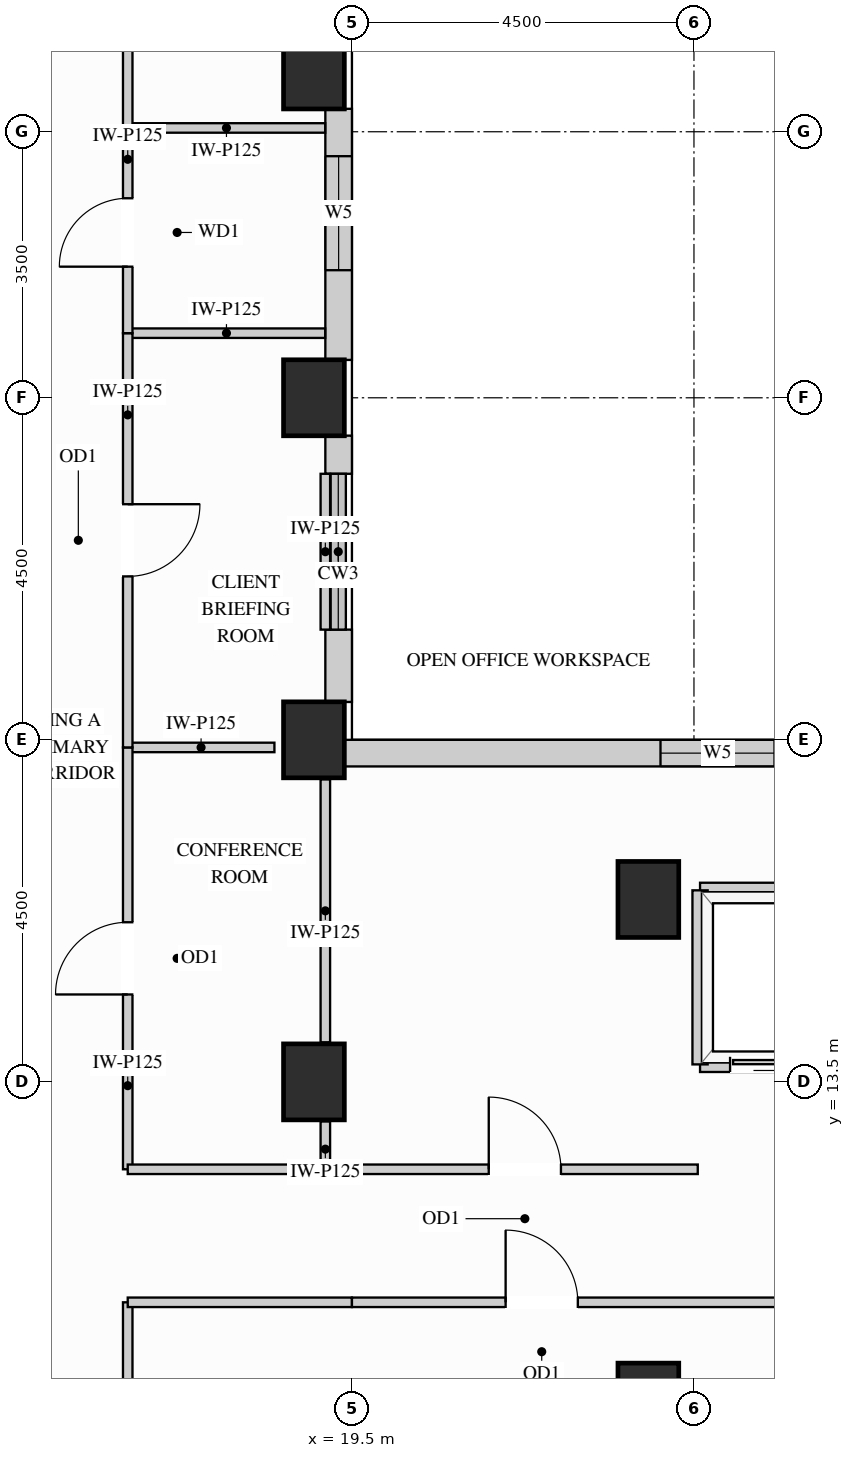
"""IFC4 building model, lengths in metres.
Left out: names, types, materials, properties, quantities, classifications, styles, units other than length and angle.
Written with IfcOpenShell. Run it as: python <this file> out.ifc"""

import sys

from ifc_helpers import new_model, si_unit, direction, frame, frame_2d, origin, origin_2d, place, context, subcontext, project, spatial, rectangle, extrude, source, transform, mapped, element, fill, save


model = new_model("IFC4")
c1 = context("Model", 3, precision=1e-05, world=origin(), true_north=direction((0.0, 1.0)))
c2 = subcontext(c1, "Body", "Model", "MODEL_VIEW")
j1 = project(units=[si_unit("LENGTHUNIT", "METRE"), si_unit("PLANEANGLEUNIT", "RADIAN")], contexts=[c1])
p1 = place(None, origin())
s1 = spatial("IfcSite", under=j1, at=p1, CompositionType="ELEMENT")
p2 = place(p1, origin())
s2 = spatial("IfcBuilding", under=s1, at=p2, CompositionType="ELEMENT")
p3 = place(p2, frame((0.0, 0.0, 197.1)))
s3 = spatial("IfcBuildingStorey", under=s2, at=p3, CompositionType="ELEMENT", Elevation=197.1)
m1 = source(origin(), c2, "Body", "SweptSolid", [
    extrude(rectangle(XDim=0.8, YDim=1.0, at=origin_2d()), origin(), (0.0, 0.0, 1.0), 3.4),
])
for number, where, z_axis, x_axis in (
    (1, (19.0, 13.5, 0.0), (0.0, 0.0, 1.0), (1.0, 0.0, 0.0)),
    (2, (19.0, 18.0, 0.0), (0.0, 0.0, 1.0), (1.0, 0.0, 0.0)),
    (3, (19.0, 22.5, 0.0), (0.0, 0.0, 1.0), (1.0, 0.0, 0.0)),
    (4, (19.0, 26.8, 0.0), (0.0, 0.0, 1.0), (1.0, 0.0, 0.0)),
    (5, (23.4, 15.9, 0.0), (0.0, 0.0, 1.0), (1.0, 0.0, 0.0)),
    (6, (23.4, 9.3, 0.0), (0.0, 0.0, 1.0), (1.0, 0.0, 0.0)),
):
    element("IfcColumn", number, at=place(p3, frame(where, z_axis=z_axis, x_axis=x_axis)), inside=s3, PredefinedType="COLUMN", context=c2, shape_type="MappedRepresentation", body=[
        mapped(m1, transform((0.0, 0.0, 0.0), x_axis=(1.0, 0.0, 0.0), y_axis=(0.0, 1.0, 0.0), z_axis=(0.0, 0.0, 1.0))),
    ])
p4 = place(p3, frame((34.502, 17.825, 0.0), z_axis=(0.0, 0.0, 1.0), x_axis=(-1.0, 0.0, 0.0)))
e7 = element("IfcWall", 7, at=p4, inside=s3, PredefinedType="SOLIDWALL", context=c2, shape_type="SweptSolid", body=[
    extrude(rectangle(XDim=15.104, YDim=0.35, at=frame_2d((7.552, 0.0))), origin(), (0.0, 0.0, 1.0), 3.385),
])
p5 = place(p4, frame((4.131, 0.0, 0.78)))
e8 = element("IfcOpeningElement", 8, at=p5, cuts=e7, PredefinedType="OPENING", context=c2, shape_type="SweptSolid", body=[
    extrude(rectangle(XDim=1.5, YDim=2.0, at=frame_2d((0.75, 1.0))), frame((0.0, 0.185, 0.0), z_axis=(0.0, -1.0, 0.0), x_axis=(1.0, 0.0, 0.0)), (0.0, 0.0, 1.0), 0.37),
])
p6 = place(p4, frame((9.442, 0.0, 0.78)))
e9 = element("IfcOpeningElement", 9, at=p6, cuts=e7, PredefinedType="OPENING", context=c2, shape_type="SweptSolid", body=[
    extrude(rectangle(XDim=1.5, YDim=2.0, at=frame_2d((0.75, 1.0))), frame((0.0, 0.185, 0.0), z_axis=(0.0, -1.0, 0.0), x_axis=(1.0, 0.0, 0.0)), (0.0, 0.0, 1.0), 0.37),
])
m2 = source(origin(), c2, "Body", "SweptSolid", [
    extrude(rectangle(XDim=0.952, YDim=0.35, at=frame_2d((0.476, 0.0))), origin(), (0.0, 0.0, 1.0), 2.612),
])
p7 = place(p3, frame((19.325, 18.498, 0.0), z_axis=(0.0, 0.0, 1.0), x_axis=(0.0, 1.0, 0.0)))
e10 = element("IfcWall", 10, at=p7, inside=s3, PredefinedType="SOLIDWALL", context=c2, shape_type="MappedRepresentation", body=[
    mapped(m2, transform((0.0, 0.0, 0.0), x_axis=(1.0, 0.0, 0.0), y_axis=(0.0, 1.0, 0.0), z_axis=(0.0, 0.0, 1.0))),
])
m3 = source(origin(), c2, "Body", "SweptSolid", [
    extrude(rectangle(XDim=0.502, YDim=0.35, at=frame_2d((0.251, 0.0))), origin(), (0.0, 0.0, 1.0), 2.612),
])
p8 = place(p3, frame((19.325, 21.5, 0.0), z_axis=(0.0, 0.0, 1.0), x_axis=(0.0, 1.0, 0.0)))
e11 = element("IfcWall", 11, at=p8, inside=s3, PredefinedType="SOLIDWALL", context=c2, shape_type="MappedRepresentation", body=[
    mapped(m3, transform((0.0, 0.0, 0.0), x_axis=(1.0, 0.0, 0.0), y_axis=(0.0, 1.0, 0.0), z_axis=(0.0, 0.0, 1.0))),
])
p9 = place(p3, frame((19.325, 22.998, 0.0), z_axis=(0.0, 0.0, 1.0), x_axis=(0.0, 1.0, 0.0)))
e12 = element("IfcWall", 12, at=p9, inside=s3, PredefinedType="SOLIDWALL", context=c2, shape_type="SweptSolid", body=[
    extrude(rectangle(XDim=3.304, YDim=0.35, at=frame_2d((1.652, 0.0))), origin(), (0.0, 0.0, 1.0), 2.612),
])
p10 = place(p9, frame((1.18, 0.0, 0.78)))
e13 = element("IfcOpeningElement", 13, at=p10, cuts=e12, PredefinedType="OPENING", context=c2, shape_type="SweptSolid", body=[
    extrude(rectangle(XDim=1.5, YDim=1.652, at=frame_2d((0.75, 0.826))), frame((0.0, 0.185, 0.0), z_axis=(0.0, -1.0, 0.0), x_axis=(1.0, 0.0, 0.0)), (0.0, 0.0, 1.0), 0.37),
])
m4 = source(origin(), c2, "Body", "SweptSolid", [
    extrude(rectangle(XDim=1.93, YDim=0.125, at=frame_2d((0.965, 0.0))), origin(), (0.0, 0.0, 1.0), 2.773),
])
p11 = place(p3, frame((16.55, 17.9, 0.0), z_axis=(0.0, 0.0, 1.0), x_axis=(1.0, 0.0, 0.0)))
e14 = element("IfcWall", 14, at=p11, inside=s3, PredefinedType="PARTITIONING", context=c2, shape_type="MappedRepresentation", body=[
    mapped(m4, transform((0.0, 0.0, 0.0), x_axis=(1.0, 0.0, 0.0), y_axis=(0.0, 1.0, 0.0), z_axis=(0.0, 0.0, 1.0))),
])
m5 = source(origin(), c2, "Body", "SweptSolid", [
    extrude(rectangle(XDim=2.598, YDim=0.125, at=frame_2d((1.299, 0.0))), origin(), (0.0, 0.0, 1.0), 3.385),
])
for number, where, z_axis, x_axis in (
    (15, (16.55, 23.35, 0.0), (0.0, 0.0, 1.0), (1.0, 0.0, 0.0)),
    (16, (16.55, 26.05, 0.0), (0.0, 0.0, 1.0), (1.0, 0.0, 0.0)),
):
    element("IfcWall", number, at=place(p3, frame(where, z_axis=z_axis, x_axis=x_axis)), inside=s3, PredefinedType="PARTITIONING", context=c2, shape_type="MappedRepresentation", body=[
        mapped(m5, transform((0.0, 0.0, 0.0), x_axis=(1.0, 0.0, 0.0), y_axis=(0.0, 1.0, 0.0), z_axis=(0.0, 0.0, 1.0))),
    ])
m6 = source(origin(), c2, "Body", "SweptSolid", [
    extrude(rectangle(XDim=0.63, YDim=0.125, at=frame_2d((0.315, 0.0))), origin(), (0.0, 0.0, 1.0), 2.773),
])
p12 = place(p3, frame((19.15, 12.35, 0.0), z_axis=(0.0, 0.0, 1.0), x_axis=(0.0, 1.0, 0.0)))
e17 = element("IfcWall", 17, at=p12, inside=s3, PredefinedType="PARTITIONING", context=c2, shape_type="MappedRepresentation", body=[
    mapped(m6, transform((0.0, 0.0, 0.0), x_axis=(1.0, 0.0, 0.0), y_axis=(0.0, 1.0, 0.0), z_axis=(0.0, 0.0, 1.0))),
])
m7 = source(origin(), c2, "Body", "SweptSolid", [
    extrude(rectangle(XDim=3.46, YDim=0.125, at=frame_2d((1.73, 0.0))), origin(), (0.0, 0.0, 1.0), 2.773),
])
p13 = place(p3, frame((19.15, 14.02, 0.0), z_axis=(0.0, 0.0, 1.0), x_axis=(0.0, 1.0, 0.0)))
e18 = element("IfcWall", 18, at=p13, inside=s3, PredefinedType="PARTITIONING", context=c2, shape_type="MappedRepresentation", body=[
    mapped(m7, transform((0.0, 0.0, 0.0), x_axis=(1.0, 0.0, 0.0), y_axis=(0.0, 1.0, 0.0), z_axis=(0.0, 0.0, 1.0))),
])
m8 = source(origin(), c2, "Body", "SweptSolid", [
    extrude(rectangle(XDim=2.05, YDim=0.125, at=frame_2d((1.025, 0.0))), origin(), (0.0, 0.0, 1.0), 2.612),
])
p14 = place(p3, frame((19.15, 19.45, 0.0), z_axis=(0.0, 0.0, 1.0), x_axis=(0.0, 1.0, 0.0)))
e19 = element("IfcWall", 19, at=p14, inside=s3, PredefinedType="PARTITIONING", context=c2, shape_type="MappedRepresentation", body=[
    mapped(m8, transform((0.0, 0.0, 0.0), x_axis=(1.0, 0.0, 0.0), y_axis=(0.0, 1.0, 0.0), z_axis=(0.0, 0.0, 1.0))),
])
p15 = place(p3, frame((16.55, 12.35, 0.0), z_axis=(0.0, 0.0, 1.0), x_axis=(0.0, 1.0, 0.0)))
e20 = element("IfcWall", 20, at=p15, inside=s3, PredefinedType="PARTITIONING", context=c2, shape_type="SweptSolid", body=[
    extrude(rectangle(XDim=5.55, YDim=0.125, at=frame_2d((2.775, 0.0))), origin(), (0.0, 0.0, 1.0), 3.385),
])
p16 = place(p15, frame((2.3, 0.0, 0.0)))
e21 = element("IfcOpeningElement", 21, at=p16, cuts=e20, PredefinedType="OPENING", context=c2, shape_type="SweptSolid", body=[
    extrude(rectangle(XDim=0.95, YDim=2.15, at=frame_2d((0.475, 1.075))), frame((0.0, 0.073, 0.0), z_axis=(0.0, -1.0, 0.0), x_axis=(1.0, 0.0, 0.0)), (0.0, 0.0, 1.0), 0.145),
])
p17 = place(p3, frame((16.55, 17.9, 0.0), z_axis=(0.0, 0.0, 1.0), x_axis=(0.0, 1.0, 0.0)))
e22 = element("IfcWall", 22, at=p17, inside=s3, PredefinedType="PARTITIONING", context=c2, shape_type="SweptSolid", body=[
    extrude(rectangle(XDim=5.45, YDim=0.125, at=frame_2d((2.725, 0.0))), origin(), (0.0, 0.0, 1.0), 3.385),
])
p18 = place(p17, frame((2.25, 0.0, 0.0)))
e23 = element("IfcOpeningElement", 23, at=p18, cuts=e22, PredefinedType="OPENING", context=c2, shape_type="SweptSolid", body=[
    extrude(rectangle(XDim=0.95, YDim=2.15, at=frame_2d((0.475, 1.075))), frame((0.0, 0.073, 0.0), z_axis=(0.0, -1.0, 0.0), x_axis=(1.0, 0.0, 0.0)), (0.0, 0.0, 1.0), 0.145),
])
p19 = place(p3, frame((16.55, 26.05, 0.0), z_axis=(0.0, 0.0, 1.0), x_axis=(0.0, 1.0, 0.0)))
e24 = element("IfcWall", 24, at=p19, inside=s3, PredefinedType="PARTITIONING", context=c2, shape_type="SweptSolid", body=[
    extrude(rectangle(XDim=6.3, YDim=0.125, at=frame_2d((3.15, 0.0))), origin(), (0.0, 0.0, 1.0), 3.385),
])
p20 = place(p19, frame((2.675, 0.0, 0.0)))
e25 = element("IfcOpeningElement", 25, at=p20, cuts=e24, PredefinedType="OPENING", context=c2, shape_type="SweptSolid", body=[
    extrude(rectangle(XDim=0.95, YDim=2.15, at=frame_2d((0.475, 1.075))), frame((0.0, 0.073, 0.0), z_axis=(0.0, -1.0, 0.0), x_axis=(1.0, 0.0, 0.0)), (0.0, 0.0, 1.0), 0.145),
])
p21 = place(p3, frame((16.55, 5.45, 0.0), z_axis=(0.0, 0.0, 1.0), x_axis=(0.0, 1.0, 0.0)))
e26 = element("IfcWall", 26, at=p21, inside=s3, PredefinedType="PARTITIONING", context=c2, shape_type="SweptSolid", body=[
    extrude(rectangle(XDim=5.15, YDim=0.125, at=frame_2d((2.575, 0.0))), origin(), (0.0, 0.0, 1.0), 3.385),
])
p22 = place(p21, frame((2.1, 0.0, 0.0)))
e27 = element("IfcOpeningElement", 27, at=p22, cuts=e26, PredefinedType="OPENING", context=c2, shape_type="SweptSolid", body=[
    extrude(rectangle(XDim=0.95, YDim=2.15, at=frame_2d((0.475, 1.075))), frame((0.0, 0.073, 0.0), z_axis=(0.0, -1.0, 0.0), x_axis=(1.0, 0.0, 0.0)), (0.0, 0.0, 1.0), 0.145),
])
p23 = place(p3, frame((16.55, 23.35, 0.0), z_axis=(0.0, 0.0, 1.0), x_axis=(0.0, 1.0, 0.0)))
e28 = element("IfcWall", 28, at=p23, inside=s3, PredefinedType="PARTITIONING", context=c2, shape_type="SweptSolid", body=[
    extrude(rectangle(XDim=2.7, YDim=0.125, at=frame_2d((1.35, 0.0))), origin(), (0.0, 0.0, 1.0), 3.385),
])
p24 = place(p23, frame((0.875, 0.0, 0.0)))
e29 = element("IfcOpeningElement", 29, at=p24, cuts=e28, PredefinedType="OPENING", context=c2, shape_type="SweptSolid", body=[
    extrude(rectangle(XDim=0.9, YDim=2.15, at=frame_2d((0.45, 1.075))), frame((0.0, 0.073, 0.0), z_axis=(0.0, -1.0, 0.0), x_axis=(1.0, 0.0, 0.0)), (0.0, 0.0, 1.0), 0.145),
])
m9 = source(origin(), c2, "Body", "SweptSolid", [
    extrude(rectangle(XDim=2.95, YDim=0.125, at=frame_2d((1.475, 0.0))), origin(), (0.0, 0.0, 1.0), 3.385),
])
p25 = place(p3, frame((16.55, 12.35, 0.0), z_axis=(0.0, 0.0, 1.0), x_axis=(1.0, 0.0, 0.0)))
e30 = element("IfcWall", 30, at=p25, inside=s3, PredefinedType="PARTITIONING", context=c2, shape_type="MappedRepresentation", body=[
    mapped(m9, transform((0.0, 0.0, 0.0), x_axis=(1.0, 0.0, 0.0), y_axis=(0.0, 1.0, 0.0), z_axis=(0.0, 0.0, 1.0))),
])
p26 = place(p3, frame((19.5, 12.35, 0.0), z_axis=(0.0, 0.0, 1.0), x_axis=(1.0, 0.0, 0.0)))
e31 = element("IfcWall", 31, at=p26, inside=s3, PredefinedType="PARTITIONING", context=c2, shape_type="SweptSolid", body=[
    extrude(rectangle(XDim=4.55, YDim=0.125, at=frame_2d((2.275, 0.0))), origin(), (0.0, 0.0, 1.0), 3.385),
])
p27 = place(p26, frame((1.8, 0.0, 0.0)))
e32 = element("IfcOpeningElement", 32, at=p27, cuts=e31, PredefinedType="OPENING", context=c2, shape_type="SweptSolid", body=[
    extrude(rectangle(XDim=0.95, YDim=2.15, at=frame_2d((0.475, 1.075))), frame((0.0, 0.073, 0.0), z_axis=(0.0, -1.0, 0.0), x_axis=(1.0, 0.0, 0.0)), (0.0, 0.0, 1.0), 0.145),
])
p28 = place(p3, frame((16.55, 10.6, 0.0), z_axis=(0.0, 0.0, 1.0), x_axis=(1.0, 0.0, 0.0)))
e33 = element("IfcWall", 33, at=p28, inside=s3, PredefinedType="PARTITIONING", context=c2, shape_type="MappedRepresentation", body=[
    mapped(m9, transform((0.0, 0.0, 0.0), x_axis=(1.0, 0.0, 0.0), y_axis=(0.0, 1.0, 0.0), z_axis=(0.0, 0.0, 1.0))),
])
p29 = place(p3, frame((19.5, 10.6, 0.0), z_axis=(0.0, 0.0, 1.0), x_axis=(1.0, 0.0, 0.0)))
e34 = element("IfcWall", 34, at=p29, inside=s3, PredefinedType="PARTITIONING", context=c2, shape_type="SweptSolid", body=[
    extrude(rectangle(XDim=7.45, YDim=0.125, at=frame_2d((3.725, 0.0))), origin(), (0.0, 0.0, 1.0), 3.385),
])
p30 = place(p29, frame((2.022, 0.0, 0.0)))
e35 = element("IfcOpeningElement", 35, at=p30, cuts=e34, PredefinedType="OPENING", context=c2, shape_type="SweptSolid", body=[
    extrude(rectangle(XDim=0.95, YDim=2.15, at=frame_2d((0.475, 1.075))), frame((0.0, 0.073, 0.0), z_axis=(0.0, -1.0, 0.0), x_axis=(1.0, 0.0, 0.0)), (0.0, 0.0, 1.0), 0.145),
])
m10 = source(origin(), c2, "Body", "SweptSolid", [
    extrude(rectangle(XDim=1.89, YDim=0.2, at=frame_2d((0.945, 0.0))), origin(), (0.0, 0.0, 1.0), 2.773),
])
p31 = place(p3, frame((24.08, 16.02, 0.0), z_axis=(0.0, 0.0, 1.0), x_axis=(1.0, 0.0, 0.0)))
e36 = element("IfcWall", 36, at=p31, inside=s3, PredefinedType="PARTITIONING", context=c2, shape_type="MappedRepresentation", body=[
    mapped(m10, transform((0.0, 0.0, 0.0), x_axis=(1.0, 0.0, 0.0), y_axis=(0.0, 1.0, 0.0), z_axis=(0.0, 0.0, 1.0))),
])
p32 = place(p3, frame((24.08, 13.73, 0.0), z_axis=(0.0, 0.0, 1.0), x_axis=(1.0, 0.0, 0.0)))
e37 = element("IfcWall", 37, at=p32, inside=s3, PredefinedType="PARTITIONING", context=c2, shape_type="SweptSolid", body=[
    extrude(rectangle(XDim=1.89, YDim=0.2, at=frame_2d((0.945, 0.0))), origin(), (0.0, 0.0, 1.0), 2.466),
])
p33 = place(p32, frame((0.395, 0.0, 0.0)))
e38 = element("IfcOpeningElement", 38, at=p33, cuts=e37, PredefinedType="OPENING", context=c2, shape_type="SweptSolid", body=[
    extrude(rectangle(XDim=1.1, YDim=2.2, at=frame_2d((0.55, 1.1))), frame((0.0, 0.11, 0.0), z_axis=(0.0, -1.0, 0.0), x_axis=(1.0, 0.0, 0.0)), (0.0, 0.0, 1.0), 0.22),
])
m11 = source(origin(), c2, "Body", "SweptSolid", [
    extrude(rectangle(XDim=2.29, YDim=0.2, at=frame_2d((1.145, 0.0))), origin(), (0.0, 0.0, 1.0), 3.385),
])
p34 = place(p3, frame((24.08, 13.73, 0.0), z_axis=(0.0, 0.0, 1.0), x_axis=(0.0, 1.0, 0.0)))
e39 = element("IfcWall", 39, at=p34, inside=s3, PredefinedType="PARTITIONING", context=c2, shape_type="MappedRepresentation", body=[
    mapped(m11, transform((0.0, 0.0, 0.0), x_axis=(1.0, 0.0, 0.0), y_axis=(0.0, 1.0, 0.0), z_axis=(0.0, 0.0, 1.0))),
])
m12 = source(origin(), c2, "Body", "SweptSolid", [
    extrude(rectangle(XDim=1.1, YDim=2.2, at=frame_2d((0.55, 1.1))), frame((0.0, 0.025, 0.0), z_axis=(0.0, -1.0, 0.0), x_axis=(1.0, 0.0, 0.0)), (0.0, 0.0, 1.0), 0.05),
])
p35 = place(p33, origin())
e40 = element("IfcDoor", 40, at=p35, inside=s3, OperationType="SLIDING_TO_LEFT", PredefinedType="DOOR", context=c2, shape_type="MappedRepresentation", body=[
    mapped(m12, transform((0.0, 0.0, 0.0), x_axis=(1.0, 0.0, 0.0), y_axis=(0.0, 1.0, 0.0), z_axis=(0.0, 0.0, 1.0))),
])
fill(e38, e40)
m13 = source(origin(), c2, "Body", "SweptSolid", [
    extrude(rectangle(XDim=0.95, YDim=2.15, at=frame_2d((0.475, 1.075))), frame((0.0, 0.025, 0.0), z_axis=(0.0, -1.0, 0.0), x_axis=(1.0, 0.0, 0.0)), (0.0, 0.0, 1.0), 0.05),
])
p36 = place(p16, origin())
e41 = element("IfcDoor", 41, at=p36, inside=s3, OperationType="SINGLE_SWING_LEFT", PredefinedType="DOOR", context=c2, shape_type="MappedRepresentation", body=[
    mapped(m13, transform((0.0, 0.0, 0.0), x_axis=(1.0, 0.0, 0.0), y_axis=(0.0, 1.0, 0.0), z_axis=(0.0, 0.0, 1.0))),
])
fill(e21, e41)
p37 = place(p18, origin())
e42 = element("IfcDoor", 42, at=p37, inside=s3, OperationType="SINGLE_SWING_RIGHT", PredefinedType="DOOR", context=c2, shape_type="MappedRepresentation", body=[
    mapped(m13, transform((0.0, 0.0, 0.0), x_axis=(1.0, 0.0, 0.0), y_axis=(0.0, 1.0, 0.0), z_axis=(0.0, 0.0, 1.0))),
])
fill(e23, e42)
p38 = place(p27, origin())
e43 = element("IfcDoor", 43, at=p38, inside=s3, OperationType="SINGLE_SWING_LEFT", PredefinedType="DOOR", context=c2, shape_type="MappedRepresentation", body=[
    mapped(m13, transform((0.0, 0.0, 0.0), x_axis=(1.0, 0.0, 0.0), y_axis=(0.0, 1.0, 0.0), z_axis=(0.0, 0.0, 1.0))),
])
fill(e32, e43)
p39 = place(p30, origin())
e44 = element("IfcDoor", 44, at=p39, inside=s3, OperationType="SINGLE_SWING_LEFT", PredefinedType="DOOR", context=c2, shape_type="MappedRepresentation", body=[
    mapped(m13, transform((0.0, 0.0, 0.0), x_axis=(1.0, 0.0, 0.0), y_axis=(0.0, 1.0, 0.0), z_axis=(0.0, 0.0, 1.0))),
])
fill(e35, e44)
m14 = source(origin(), c2, "Body", "SweptSolid", [
    extrude(rectangle(XDim=0.9, YDim=2.15, at=frame_2d((0.45, 1.075))), frame((0.0, 0.025, 0.0), z_axis=(0.0, -1.0, 0.0), x_axis=(1.0, 0.0, 0.0)), (0.0, 0.0, 1.0), 0.05),
])
p40 = place(p24, origin())
e45 = element("IfcDoor", 45, at=p40, inside=s3, OperationType="SINGLE_SWING_LEFT", PredefinedType="DOOR", context=c2, shape_type="MappedRepresentation", body=[
    mapped(m14, transform((0.0, 0.0, 0.0), x_axis=(1.0, 0.0, 0.0), y_axis=(0.0, 1.0, 0.0), z_axis=(0.0, 0.0, 1.0))),
])
fill(e29, e45)
m15 = source(origin(), c2, "Body", "SweptSolid", [
    extrude(rectangle(XDim=1.5, YDim=2.0, at=frame_2d((0.75, 1.0))), frame((0.0, 0.03, 0.0), z_axis=(0.0, -1.0, 0.0), x_axis=(1.0, 0.0, 0.0)), (0.0, 0.0, 1.0), 0.06),
])
p41 = place(p6, origin())
e46 = element("IfcWindow", 46, at=p41, inside=s3, PartitioningType="SINGLE_PANEL", PredefinedType="WINDOW", context=c2, shape_type="MappedRepresentation", body=[
    mapped(m15, transform((0.0, 0.0, 0.0), x_axis=(1.0, 0.0, 0.0), y_axis=(0.0, 1.0, 0.0), z_axis=(0.0, 0.0, 1.0))),
])
fill(e9, e46)
m16 = source(origin(), c2, "Body", "SweptSolid", [
    extrude(rectangle(XDim=1.5, YDim=1.652, at=frame_2d((0.75, 0.826))), frame((0.0, 0.03, 0.0), z_axis=(0.0, -1.0, 0.0), x_axis=(1.0, 0.0, 0.0)), (0.0, 0.0, 1.0), 0.06),
])
p42 = place(p10, origin())
e47 = element("IfcWindow", 47, at=p42, inside=s3, PartitioningType="SINGLE_PANEL", PredefinedType="WINDOW", context=c2, shape_type="MappedRepresentation", body=[
    mapped(m16, transform((0.0, 0.0, 0.0), x_axis=(1.0, 0.0, 0.0), y_axis=(0.0, 1.0, 0.0), z_axis=(0.0, 0.0, 1.0))),
])
fill(e13, e47)
save(model, sys.argv[1])
